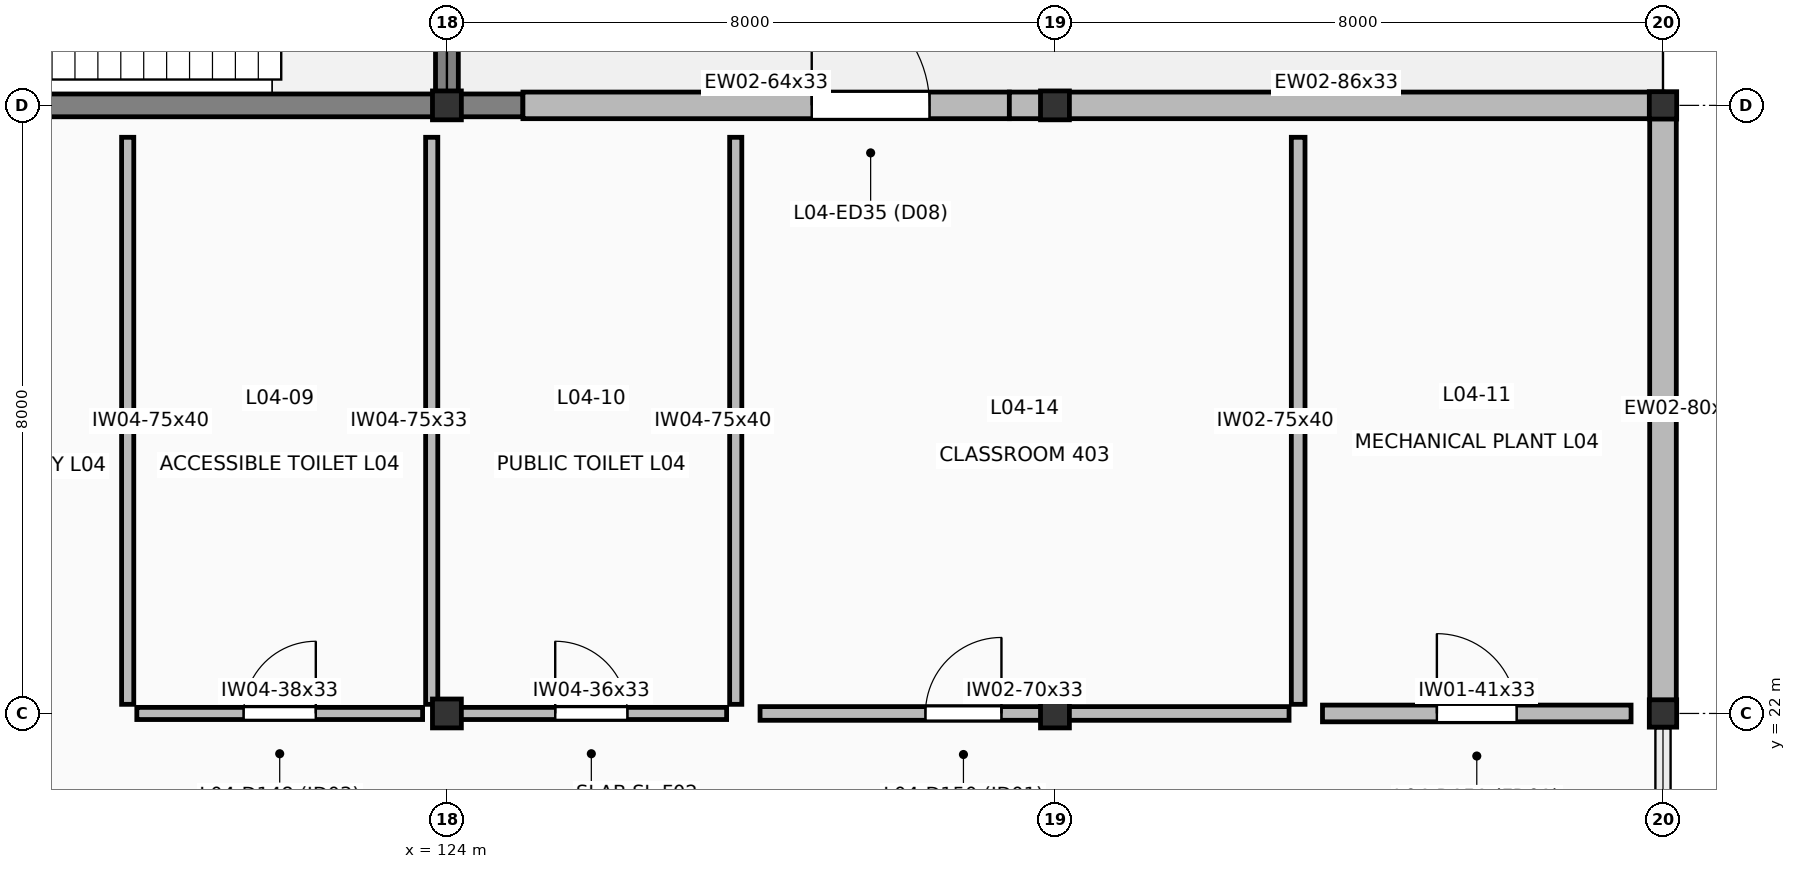
"""IFC4 building model, lengths in metres.
Left out: names, types, materials, properties, quantities, classifications, styles, units other than length and angle.
Written with IfcOpenShell. Run it as: python <this file> out.ifc"""

import sys

from ifc_helpers import new_model, si_unit, direction, frame, frame_2d, origin, origin_2d, place, context, subcontext, project, spatial, rectangle, extrude, element, fill, save


model = new_model("IFC4")
c1 = context("Model", 3, precision=1e-05, world=origin(), true_north=direction((0.0, 1.0)))
c2 = subcontext(c1, "Body", "Model", "MODEL_VIEW")
j1 = project(units=[si_unit("LENGTHUNIT", "METRE"), si_unit("PLANEANGLEUNIT", "RADIAN")], contexts=[c1])
p1 = place(None, origin())
s1 = spatial("IfcSite", under=j1, at=p1, CompositionType="ELEMENT")
p2 = place(p1, origin())
s2 = spatial("IfcBuilding", under=s1, at=p2, CompositionType="ELEMENT")
p3 = place(p2, frame((0.0, 0.0, 18.0)))
s3 = spatial("IfcBuildingStorey", under=s2, at=p3, CompositionType="ELEMENT", Elevation=18.0)
for number, where, z_axis, x_axis in (
    (1, (124.0, 22.0, 0.0), (0.0, 0.0, 1.0), (1.0, 0.0, 0.0)),
    (2, (124.0, 30.0, 0.0), (0.0, 0.0, 1.0), (1.0, 0.0, 0.0)),
    (3, (132.0, 22.0, 0.0), (0.0, 0.0, 1.0), (1.0, 0.0, 0.0)),
    (4, (132.0, 30.0, 0.0), (0.0, 0.0, 1.0), (1.0, 0.0, 0.0)),
):
    element("IfcColumn", number, at=place(p3, frame(where, z_axis=z_axis, x_axis=x_axis)), inside=s3, PredefinedType="COLUMN", context=c2, shape_type="SweptSolid", body=[
        extrude(rectangle(XDim=0.38, YDim=0.38, at=origin_2d()), origin(), (0.0, 0.0, 1.0), 4.2),
    ])
for number, where, z_axis, x_axis in (
    (5, (140.0, 22.0, 0.0), (0.0, 0.0, 1.0), (1.0, 0.0, 0.0)),
    (6, (140.0, 30.0, 0.0), (0.0, 0.0, 1.0), (1.0, 0.0, 0.0)),
):
    element("IfcColumn", number, at=place(p3, frame(where, z_axis=z_axis, x_axis=x_axis)), inside=s3, PredefinedType="COLUMN", context=c2, shape_type="SweptSolid", body=[
        extrude(rectangle(XDim=0.36, YDim=0.36, at=origin_2d()), origin(), (0.0, 0.0, 1.0), 4.2),
    ])
p4 = place(p3, frame((117.778, 30.0, 0.0), z_axis=(0.0, 0.0, 1.0), x_axis=(1.0, 0.0, 0.0)))
e7 = element("IfcWall", 7, at=p4, inside=s3, PredefinedType="SOLIDWALL", context=c2, shape_type="SweptSolid", body=[
    extrude(rectangle(XDim=7.222, YDim=0.3, at=frame_2d((3.611, 0.0))), origin(), (0.0, 0.0, 1.0), 4.2),
])
p5 = place(p3, frame((125.0, 30.0, 0.0), z_axis=(0.0, 0.0, 1.0), x_axis=(1.0, 0.0, 0.0)))
e8 = element("IfcWall", 8, at=p5, inside=s3, PredefinedType="SOLIDWALL", context=c2, shape_type="SweptSolid", body=[
    extrude(rectangle(XDim=6.4, YDim=0.35, at=frame_2d((3.2, 0.0))), origin(), (0.0, 0.0, 1.0), 3.285),
])
p6 = place(p5, frame((3.8, 0.0, 0.0)))
e9 = element("IfcOpeningElement", 9, at=p6, cuts=e8, PredefinedType="OPENING", context=c2, shape_type="SweptSolid", body=[
    extrude(rectangle(XDim=1.55, YDim=2.2, at=frame_2d((0.775, 1.1))), frame((0.0, 0.185, 0.0), z_axis=(0.0, -1.0, 0.0), x_axis=(1.0, 0.0, 0.0)), (0.0, 0.0, 1.0), 0.37),
])
p7 = place(p3, frame((131.4, 30.0, 0.0), z_axis=(0.0, 0.0, 1.0), x_axis=(1.0, 0.0, 0.0)))
e10 = element("IfcWall", 10, at=p7, inside=s3, PredefinedType="SOLIDWALL", context=c2, shape_type="SweptSolid", body=[
    extrude(rectangle(XDim=8.6, YDim=0.35, at=frame_2d((4.3, 0.0))), origin(), (0.0, 0.0, 1.0), 3.285),
])
p8 = place(p3, frame((140.0, 30.0, 0.0), z_axis=(0.0, 0.0, 1.0), x_axis=(0.0, -1.0, 0.0)))
e11 = element("IfcWall", 11, at=p8, inside=s3, PredefinedType="SOLIDWALL", context=c2, shape_type="SweptSolid", body=[
    extrude(rectangle(XDim=8.0, YDim=0.35, at=frame_2d((4.0, 0.0))), origin(), (0.0, 0.0, 1.0), 3.345),
])
p9 = place(p3, frame((124.0, 36.0, 0.0), z_axis=(0.0, 0.0, 1.0), x_axis=(0.0, -1.0, 0.0)))
e12 = element("IfcWall", 12, at=p9, inside=s3, PredefinedType="SHEAR", context=c2, shape_type="SweptSolid", body=[
    extrude(rectangle(XDim=6.0, YDim=0.3, at=frame_2d((3.0, 0.0))), origin(), (0.0, 0.0, 1.0), 4.2),
])
p10 = place(p3, frame((119.92, 22.0, 0.0), z_axis=(0.0, 0.0, 1.0), x_axis=(1.0, 0.0, 0.0)))
e13 = element("IfcWall", 13, at=p10, inside=s3, PredefinedType="PLUMBINGWALL", context=c2, shape_type="SweptSolid", body=[
    extrude(rectangle(XDim=3.76, YDim=0.16, at=frame_2d((1.88, 0.0))), origin(), (0.0, 0.0, 1.0), 3.285),
])
p11 = place(p10, frame((1.405, 0.0, 0.0)))
e14 = element("IfcOpeningElement", 14, at=p11, cuts=e13, PredefinedType="OPENING", context=c2, shape_type="SweptSolid", body=[
    extrude(rectangle(XDim=0.95, YDim=2.15, at=frame_2d((0.475, 1.075))), frame((0.0, 0.09, 0.0), z_axis=(0.0, -1.0, 0.0), x_axis=(1.0, 0.0, 0.0)), (0.0, 0.0, 1.0), 0.18),
])
p12 = place(p3, frame((119.8, 29.58, 0.0), z_axis=(0.0, 0.0, 1.0), x_axis=(0.0, -1.0, 0.0)))
e15 = element("IfcWall", 15, at=p12, inside=s3, PredefinedType="PLUMBINGWALL", context=c2, shape_type="SweptSolid", body=[
    extrude(rectangle(XDim=7.46, YDim=0.16, at=frame_2d((3.73, 0.0))), origin(), (0.0, 0.0, 1.0), 4.0),
])
p13 = place(p3, frame((123.8, 22.12, 0.0), z_axis=(0.0, 0.0, 1.0), x_axis=(0.0, 1.0, 0.0)))
e16 = element("IfcWall", 16, at=p13, inside=s3, PredefinedType="PLUMBINGWALL", context=c2, shape_type="SweptSolid", body=[
    extrude(rectangle(XDim=7.46, YDim=0.16, at=frame_2d((3.73, 0.0))), origin(), (0.0, 0.0, 1.0), 3.345),
])
p14 = place(p3, frame((124.12, 22.0, 0.0), z_axis=(0.0, 0.0, 1.0), x_axis=(1.0, 0.0, 0.0)))
e17 = element("IfcWall", 17, at=p14, inside=s3, PredefinedType="PLUMBINGWALL", context=c2, shape_type="SweptSolid", body=[
    extrude(rectangle(XDim=3.56, YDim=0.16, at=frame_2d((1.78, 0.0))), origin(), (0.0, 0.0, 1.0), 3.285),
])
p15 = place(p14, frame((1.305, 0.0, 0.0)))
e18 = element("IfcOpeningElement", 18, at=p15, cuts=e17, PredefinedType="OPENING", context=c2, shape_type="SweptSolid", body=[
    extrude(rectangle(XDim=0.95, YDim=2.15, at=frame_2d((0.475, 1.075))), frame((0.0, 0.09, 0.0), z_axis=(0.0, -1.0, 0.0), x_axis=(1.0, 0.0, 0.0)), (0.0, 0.0, 1.0), 0.18),
])
p16 = place(p3, frame((127.8, 22.12, 0.0), z_axis=(0.0, 0.0, 1.0), x_axis=(0.0, 1.0, 0.0)))
e19 = element("IfcWall", 19, at=p16, inside=s3, PredefinedType="PLUMBINGWALL", context=c2, shape_type="SweptSolid", body=[
    extrude(rectangle(XDim=7.46, YDim=0.16, at=frame_2d((3.73, 0.0))), origin(), (0.0, 0.0, 1.0), 4.0),
])
p17 = place(p3, frame((128.12, 22.0, 0.0), z_axis=(0.0, 0.0, 1.0), x_axis=(1.0, 0.0, 0.0)))
e20 = element("IfcWall", 20, at=p17, inside=s3, PredefinedType="PARTITIONING", context=c2, shape_type="SweptSolid", body=[
    extrude(rectangle(XDim=6.96, YDim=0.18, at=frame_2d((3.48, 0.0))), origin(), (0.0, 0.0, 1.0), 3.285),
])
p18 = place(p17, frame((2.176, 0.0, 0.0)))
e21 = element("IfcOpeningElement", 21, at=p18, cuts=e20, PredefinedType="OPENING", context=c2, shape_type="SweptSolid", body=[
    extrude(rectangle(XDim=1.0, YDim=2.15, at=frame_2d((0.5, 1.075))), frame((0.0, 0.1, 0.0), z_axis=(0.0, -1.0, 0.0), x_axis=(1.0, 0.0, 0.0)), (0.0, 0.0, 1.0), 0.2),
])
p19 = place(p3, frame((135.2, 22.12, 0.0), z_axis=(0.0, 0.0, 1.0), x_axis=(0.0, 1.0, 0.0)))
e22 = element("IfcWall", 22, at=p19, inside=s3, PredefinedType="PARTITIONING", context=c2, shape_type="SweptSolid", body=[
    extrude(rectangle(XDim=7.46, YDim=0.18, at=frame_2d((3.73, 0.0))), origin(), (0.0, 0.0, 1.0), 4.0),
])
p20 = place(p3, frame((135.52, 22.0, 0.0), z_axis=(0.0, 0.0, 1.0), x_axis=(1.0, 0.0, 0.0)))
e23 = element("IfcWall", 23, at=p20, inside=s3, PredefinedType="SOLIDWALL", context=c2, shape_type="SweptSolid", body=[
    extrude(rectangle(XDim=4.06, YDim=0.22, at=frame_2d((2.03, 0.0))), origin(), (0.0, 0.0, 1.0), 3.285),
])
p21 = place(p20, frame((1.505, 0.0, 0.0)))
e24 = element("IfcOpeningElement", 24, at=p21, cuts=e23, PredefinedType="OPENING", context=c2, shape_type="SweptSolid", body=[
    extrude(rectangle(XDim=1.05, YDim=2.2, at=frame_2d((0.525, 1.1))), frame((0.0, 0.12, 0.0), z_axis=(0.0, -1.0, 0.0), x_axis=(1.0, 0.0, 0.0)), (0.0, 0.0, 1.0), 0.24),
])
p22 = place(p6, origin())
e25 = element("IfcDoor", 25, at=p22, inside=s3, OperationType="SINGLE_SWING_LEFT", PredefinedType="DOOR", context=c2, shape_type="SweptSolid", body=[
    extrude(rectangle(XDim=1.55, YDim=2.2, at=frame_2d((0.775, 1.1))), frame((0.0, 0.025, 0.0), z_axis=(0.0, -1.0, 0.0), x_axis=(1.0, 0.0, 0.0)), (0.0, 0.0, 1.0), 0.05),
])
fill(e9, e25)
p23 = place(p11, origin())
e26 = element("IfcDoor", 26, at=p23, inside=s3, OperationType="SINGLE_SWING_RIGHT", PredefinedType="DOOR", context=c2, shape_type="SweptSolid", body=[
    extrude(rectangle(XDim=0.95, YDim=2.15, at=frame_2d((0.475, 1.075))), frame((0.0, 0.025, 0.0), z_axis=(0.0, -1.0, 0.0), x_axis=(1.0, 0.0, 0.0)), (0.0, 0.0, 1.0), 0.05),
])
fill(e14, e26)
p24 = place(p15, origin())
e27 = element("IfcDoor", 27, at=p24, inside=s3, OperationType="SINGLE_SWING_LEFT", PredefinedType="DOOR", context=c2, shape_type="SweptSolid", body=[
    extrude(rectangle(XDim=0.95, YDim=2.15, at=frame_2d((0.475, 1.075))), frame((0.0, 0.025, 0.0), z_axis=(0.0, -1.0, 0.0), x_axis=(1.0, 0.0, 0.0)), (0.0, 0.0, 1.0), 0.05),
])
fill(e18, e27)
p25 = place(p18, origin())
e28 = element("IfcDoor", 28, at=p25, inside=s3, OperationType="SINGLE_SWING_RIGHT", PredefinedType="DOOR", context=c2, shape_type="SweptSolid", body=[
    extrude(rectangle(XDim=1.0, YDim=2.15, at=frame_2d((0.5, 1.075))), frame((0.0, 0.025, 0.0), z_axis=(0.0, -1.0, 0.0), x_axis=(1.0, 0.0, 0.0)), (0.0, 0.0, 1.0), 0.05),
])
fill(e21, e28)
p26 = place(p21, origin())
e29 = element("IfcDoor", 29, at=p26, inside=s3, OperationType="SINGLE_SWING_LEFT", PredefinedType="DOOR", context=c2, shape_type="SweptSolid", body=[
    extrude(rectangle(XDim=1.05, YDim=2.2, at=frame_2d((0.525, 1.1))), frame((0.0, 0.025, 0.0), z_axis=(0.0, -1.0, 0.0), x_axis=(1.0, 0.0, 0.0)), (0.0, 0.0, 1.0), 0.05),
])
fill(e24, e29)
save(model, sys.argv[1])
